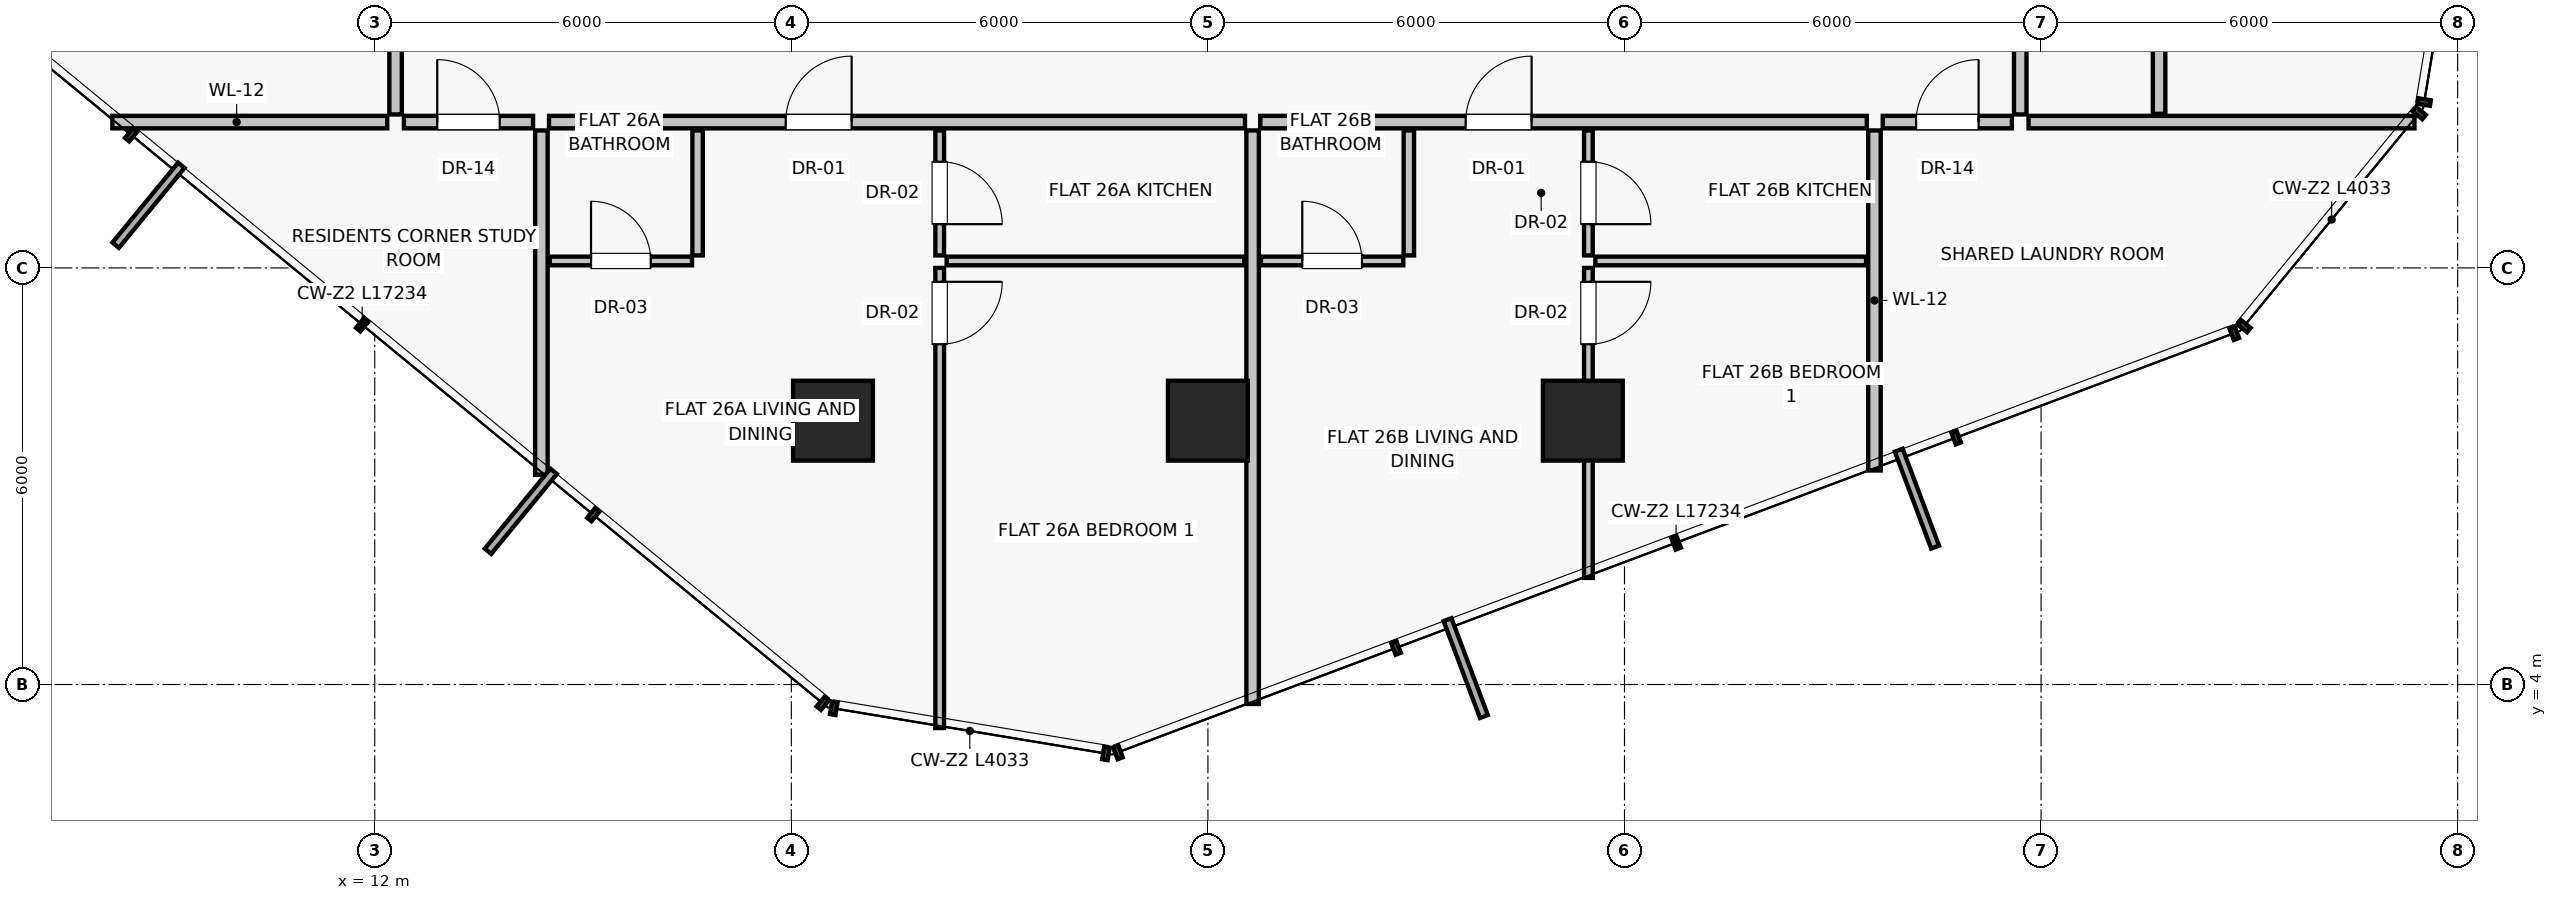
"""IFC4 building model, lengths in metres.
Left out: names, types, materials, properties, quantities, classifications, styles, units other than length and angle.
Written with IfcOpenShell. Run it as: python <this file> out.ifc"""

import sys

from ifc_helpers import new_model, si_unit, direction, frame, frame_2d, origin, origin_2d, place, context, subcontext, project, spatial, rectangle, extrude, source, transform, mapped, element, fill, save


model = new_model("IFC4")
c1 = context("Model", 3, precision=1e-05, world=origin(), true_north=direction((0.0, 1.0)))
c2 = subcontext(c1, "Body", "Model", "MODEL_VIEW")
j1 = project(units=[si_unit("LENGTHUNIT", "METRE"), si_unit("PLANEANGLEUNIT", "RADIAN")], contexts=[c1])
p1 = place(None, origin())
s1 = spatial("IfcSite", under=j1, at=p1, CompositionType="ELEMENT")
p2 = place(p1, origin())
s2 = spatial("IfcBuilding", under=s1, at=p2, CompositionType="ELEMENT")
p3 = place(p2, frame((0.0, 0.0, 95.95)))
s3 = spatial("IfcBuildingStorey", under=s2, at=p3, CompositionType="ELEMENT", Elevation=95.95)
for number, where, z_axis, x_axis in (
    (1, (18.6, 7.8, 0.0), (0.0, 0.0, 1.0), (1.0, 0.0, 0.0)),
    (2, (24.0, 7.8, 0.0), (0.0, 0.0, 1.0), (1.0, 0.0, 0.0)),
    (3, (29.4, 7.8, 0.0), (0.0, 0.0, 1.0), (1.0, 0.0, 0.0)),
):
    element("IfcColumn", number, at=place(p3, frame(where, z_axis=z_axis, x_axis=x_axis)), inside=s3, PredefinedType="COLUMN", context=c2, shape_type="SweptSolid", body=[
        extrude(rectangle(XDim=1.15, YDim=1.15, at=origin_2d()), origin(), (0.0, 0.0, 1.0), 3.25),
    ])
p4 = place(p3, frame((14.4, 11.98, 0.0), z_axis=(0.0, 0.0, 1.0), x_axis=(0.0, -1.0, 0.0)))
e4 = element("IfcWall", 4, at=p4, inside=s3, PredefinedType="PARTITIONING", context=c2, shape_type="SweptSolid", body=[
    extrude(rectangle(XDim=4.959, YDim=0.18, at=frame_2d((2.479, 0.0))), origin(), (0.0, 0.0, 1.0), 3.0),
])
p5 = place(p3, frame((33.6, 11.98, 0.0), z_axis=(0.0, 0.0, 1.0), x_axis=(0.0, -1.0, 0.0)))
e5 = element("IfcWall", 5, at=p5, inside=s3, PredefinedType="PARTITIONING", context=c2, shape_type="SweptSolid", body=[
    extrude(rectangle(XDim=4.897, YDim=0.18, at=frame_2d((2.449, 0.0))), origin(), (0.0, 0.0, 1.0), 3.0),
])
p6 = place(p3, frame((14.51, 12.1, 0.0), z_axis=(0.0, 0.0, 1.0), x_axis=(1.0, 0.0, 0.0)))
e6 = element("IfcWall", 6, at=p6, inside=s3, PredefinedType="PARTITIONING", context=c2, shape_type="SweptSolid", body=[
    extrude(rectangle(XDim=10.024, YDim=0.18, at=frame_2d((5.012, 0.0))), origin(), (0.0, 0.0, 1.0), 2.58),
])
p7 = place(p6, frame((3.408, 0.0, 0.0)))
e7 = element("IfcOpeningElement", 7, at=p7, cuts=e6, PredefinedType="OPENING", context=c2, shape_type="SweptSolid", body=[
    extrude(rectangle(XDim=0.95, YDim=2.02, at=frame_2d((0.475, 1.01))), frame((0.0, 0.1, 0.0), z_axis=(0.0, -1.0, 0.0), x_axis=(1.0, 0.0, 0.0)), (0.0, 0.0, 1.0), 0.2),
])
p8 = place(p3, frame((16.65, 11.98, 0.0), z_axis=(0.0, 0.0, 1.0), x_axis=(0.0, -1.0, 0.0)))
e8 = element("IfcWall", 8, at=p8, inside=s3, PredefinedType="PARTITIONING", context=c2, shape_type="SweptSolid", body=[
    extrude(rectangle(XDim=1.8, YDim=0.15, at=frame_2d((0.9, 0.0))), origin(), (0.0, 0.0, 1.0), 3.0),
])
p9 = place(p3, frame((14.52, 10.1, 0.0), z_axis=(0.0, 0.0, 1.0), x_axis=(1.0, 0.0, 0.0)))
e9 = element("IfcWall", 9, at=p9, inside=s3, PredefinedType="PARTITIONING", context=c2, shape_type="SweptSolid", body=[
    extrude(rectangle(XDim=2.05, YDim=0.125, at=frame_2d((1.025, 0.0))), origin(), (0.0, 0.0, 1.0), 3.0),
])
p10 = place(p9, frame((0.595, 0.0, 0.0)))
e10 = element("IfcOpeningElement", 10, at=p10, cuts=e9, PredefinedType="OPENING", context=c2, shape_type="SweptSolid", body=[
    extrude(rectangle(XDim=0.86, YDim=2.01, at=frame_2d((0.43, 1.005))), frame((0.0, 0.073, 0.0), z_axis=(0.0, -1.0, 0.0), x_axis=(1.0, 0.0, 0.0)), (0.0, 0.0, 1.0), 0.145),
])
p11 = place(p3, frame((20.137, 11.98, 0.0), z_axis=(0.0, 0.0, 1.0), x_axis=(0.0, -1.0, 0.0)))
e11 = element("IfcWall", 11, at=p11, inside=s3, PredefinedType="PARTITIONING", context=c2, shape_type="SweptSolid", body=[
    extrude(rectangle(XDim=1.8, YDim=0.125, at=frame_2d((0.9, 0.0))), origin(), (0.0, 0.0, 1.0), 3.0),
])
p12 = place(p11, frame((0.45, 0.0, 0.0)))
e12 = element("IfcOpeningElement", 12, at=p12, cuts=e11, PredefinedType="OPENING", context=c2, shape_type="SweptSolid", body=[
    extrude(rectangle(XDim=0.9, YDim=2.01, at=frame_2d((0.45, 1.005))), frame((0.0, 0.073, 0.0), z_axis=(0.0, -1.0, 0.0), x_axis=(1.0, 0.0, 0.0)), (0.0, 0.0, 1.0), 0.145),
])
p13 = place(p3, frame((20.237, 10.1, 0.0), z_axis=(0.0, 0.0, 1.0), x_axis=(1.0, 0.0, 0.0)))
e13 = element("IfcWall", 13, at=p13, inside=s3, PredefinedType="PARTITIONING", context=c2, shape_type="SweptSolid", body=[
    extrude(rectangle(XDim=4.287, YDim=0.125, at=frame_2d((2.144, 0.0))), origin(), (0.0, 0.0, 1.0), 3.0),
])
p14 = place(p3, frame((20.137, 10.0, 0.0), z_axis=(0.0, 0.0, 1.0), x_axis=(0.0, -1.0, 0.0)))
e14 = element("IfcWall", 14, at=p14, inside=s3, PredefinedType="PARTITIONING", context=c2, shape_type="SweptSolid", body=[
    extrude(rectangle(XDim=6.627, YDim=0.125, at=frame_2d((3.313, 0.0))), origin(), (0.0, 0.0, 1.0), 3.0),
])
p15 = place(p14, frame((0.2, 0.0, 0.0)))
e15 = element("IfcOpeningElement", 15, at=p15, cuts=e14, PredefinedType="OPENING", context=c2, shape_type="SweptSolid", body=[
    extrude(rectangle(XDim=0.9, YDim=2.01, at=frame_2d((0.45, 1.005))), frame((0.0, 0.073, 0.0), z_axis=(0.0, -1.0, 0.0), x_axis=(1.0, 0.0, 0.0)), (0.0, 0.0, 1.0), 0.145),
])
p16 = place(p3, frame((24.644, 11.98, 0.0), z_axis=(0.0, 0.0, 1.0), x_axis=(0.0, -1.0, 0.0)))
e16 = element("IfcWall", 16, at=p16, inside=s3, PredefinedType="PARTITIONING", context=c2, shape_type="SweptSolid", body=[
    extrude(rectangle(XDim=8.26, YDim=0.18, at=frame_2d((4.13, 0.0))), origin(), (0.0, 0.0, 1.0), 3.0),
])
p17 = place(p3, frame((24.754, 12.1, 0.0), z_axis=(0.0, 0.0, 1.0), x_axis=(1.0, 0.0, 0.0)))
e17 = element("IfcWall", 17, at=p17, inside=s3, PredefinedType="PARTITIONING", context=c2, shape_type="SweptSolid", body=[
    extrude(rectangle(XDim=8.736, YDim=0.18, at=frame_2d((4.368, 0.0))), origin(), (0.0, 0.0, 1.0), 2.58),
])
p18 = place(p17, frame((2.958, 0.0, 0.0)))
e18 = element("IfcOpeningElement", 18, at=p18, cuts=e17, PredefinedType="OPENING", context=c2, shape_type="SweptSolid", body=[
    extrude(rectangle(XDim=0.95, YDim=2.02, at=frame_2d((0.475, 1.01))), frame((0.0, 0.1, 0.0), z_axis=(0.0, -1.0, 0.0), x_axis=(1.0, 0.0, 0.0)), (0.0, 0.0, 1.0), 0.2),
])
p19 = place(p3, frame((26.894, 11.98, 0.0), z_axis=(0.0, 0.0, 1.0), x_axis=(0.0, -1.0, 0.0)))
e19 = element("IfcWall", 19, at=p19, inside=s3, PredefinedType="PARTITIONING", context=c2, shape_type="SweptSolid", body=[
    extrude(rectangle(XDim=1.8, YDim=0.15, at=frame_2d((0.9, 0.0))), origin(), (0.0, 0.0, 1.0), 3.0),
])
p20 = place(p3, frame((24.764, 10.1, 0.0), z_axis=(0.0, 0.0, 1.0), x_axis=(1.0, 0.0, 0.0)))
e20 = element("IfcWall", 20, at=p20, inside=s3, PredefinedType="PARTITIONING", context=c2, shape_type="SweptSolid", body=[
    extrude(rectangle(XDim=2.05, YDim=0.125, at=frame_2d((1.025, 0.0))), origin(), (0.0, 0.0, 1.0), 3.0),
])
p21 = place(p20, frame((0.595, 0.0, 0.0)))
e21 = element("IfcOpeningElement", 21, at=p21, cuts=e20, PredefinedType="OPENING", context=c2, shape_type="SweptSolid", body=[
    extrude(rectangle(XDim=0.86, YDim=2.01, at=frame_2d((0.43, 1.005))), frame((0.0, 0.073, 0.0), z_axis=(0.0, -1.0, 0.0), x_axis=(1.0, 0.0, 0.0)), (0.0, 0.0, 1.0), 0.145),
])
p22 = place(p3, frame((29.48, 11.98, 0.0), z_axis=(0.0, 0.0, 1.0), x_axis=(0.0, -1.0, 0.0)))
e22 = element("IfcWall", 22, at=p22, inside=s3, PredefinedType="PARTITIONING", context=c2, shape_type="SweptSolid", body=[
    extrude(rectangle(XDim=1.8, YDim=0.125, at=frame_2d((0.9, 0.0))), origin(), (0.0, 0.0, 1.0), 2.378),
])
p23 = place(p22, frame((0.45, 0.0, 0.0)))
e23 = element("IfcOpeningElement", 23, at=p23, cuts=e22, PredefinedType="OPENING", context=c2, shape_type="SweptSolid", body=[
    extrude(rectangle(XDim=0.9, YDim=2.01, at=frame_2d((0.45, 1.005))), frame((0.0, 0.073, 0.0), z_axis=(0.0, -1.0, 0.0), x_axis=(1.0, 0.0, 0.0)), (0.0, 0.0, 1.0), 0.145),
])
p24 = place(p3, frame((29.58, 10.1, 0.0), z_axis=(0.0, 0.0, 1.0), x_axis=(1.0, 0.0, 0.0)))
e24 = element("IfcWall", 24, at=p24, inside=s3, PredefinedType="PARTITIONING", context=c2, shape_type="SweptSolid", body=[
    extrude(rectangle(XDim=3.9, YDim=0.125, at=frame_2d((1.95, 0.0))), origin(), (0.0, 0.0, 1.0), 3.0),
])
p25 = place(p3, frame((29.48, 10.0, 0.0), z_axis=(0.0, 0.0, 1.0), x_axis=(0.0, -1.0, 0.0)))
e25 = element("IfcWall", 25, at=p25, inside=s3, PredefinedType="PARTITIONING", context=c2, shape_type="SweptSolid", body=[
    extrude(rectangle(XDim=4.465, YDim=0.125, at=frame_2d((2.232, 0.0))), origin(), (0.0, 0.0, 1.0), 2.378),
])
p26 = place(p25, frame((0.2, 0.0, 0.0)))
e26 = element("IfcOpeningElement", 26, at=p26, cuts=e25, PredefinedType="OPENING", context=c2, shape_type="SweptSolid", body=[
    extrude(rectangle(XDim=0.9, YDim=2.01, at=frame_2d((0.45, 1.005))), frame((0.0, 0.073, 0.0), z_axis=(0.0, -1.0, 0.0), x_axis=(1.0, 0.0, 0.0)), (0.0, 0.0, 1.0), 0.145),
])
p27 = place(p3, frame((12.18, 12.1, 0.0), z_axis=(0.0, 0.0, 1.0), x_axis=(-1.0, 0.0, 0.0)))
e27 = element("IfcWall", 27, at=p27, inside=s3, PredefinedType="PARTITIONING", context=c2, shape_type="SweptSolid", body=[
    extrude(rectangle(XDim=3.959, YDim=0.18, at=frame_2d((1.979, 0.0))), origin(), (0.0, 0.0, 1.0), 3.0),
])
p28 = place(p3, frame((12.3, 12.21, 0.0), z_axis=(0.0, 0.0, 1.0), x_axis=(0.0, 1.0, 0.0)))
e28 = element("IfcWall", 28, at=p28, inside=s3, PredefinedType="PARTITIONING", context=c2, shape_type="SweptSolid", body=[
    extrude(rectangle(XDim=4.626, YDim=0.18, at=frame_2d((2.313, 0.0))), origin(), (0.0, 0.0, 1.0), 3.0),
])
p29 = place(p28, frame((1.813, 0.0, 0.0)))
e29 = element("IfcOpeningElement", 29, at=p29, cuts=e28, PredefinedType="OPENING", context=c2, shape_type="SweptSolid", body=[
    extrude(rectangle(XDim=1.0, YDim=2.01, at=frame_2d((0.5, 1.005))), frame((0.0, 0.1, 0.0), z_axis=(0.0, -1.0, 0.0), x_axis=(1.0, 0.0, 0.0)), (0.0, 0.0, 1.0), 0.2),
])
p30 = place(p3, frame((35.82, 12.1, 0.0), z_axis=(0.0, 0.0, 1.0), x_axis=(1.0, 0.0, 0.0)))
e30 = element("IfcWall", 30, at=p30, inside=s3, PredefinedType="PARTITIONING", context=c2, shape_type="SweptSolid", body=[
    extrude(rectangle(XDim=5.558, YDim=0.18, at=frame_2d((2.779, 0.0))), origin(), (0.0, 0.0, 1.0), 3.0),
])
p31 = place(p3, frame((35.7, 12.21, 0.0), z_axis=(0.0, 0.0, 1.0), x_axis=(0.0, 1.0, 0.0)))
e31 = element("IfcWall", 31, at=p31, inside=s3, PredefinedType="PARTITIONING", context=c2, shape_type="SweptSolid", body=[
    extrude(rectangle(XDim=6.28, YDim=0.18, at=frame_2d((3.14, 0.0))), origin(), (0.0, 0.0, 1.0), 2.58),
])
p32 = place(p31, frame((2.64, 0.0, 0.0)))
e32 = element("IfcOpeningElement", 32, at=p32, cuts=e31, PredefinedType="OPENING", context=c2, shape_type="SweptSolid", body=[
    extrude(rectangle(XDim=1.0, YDim=2.01, at=frame_2d((0.5, 1.005))), frame((0.0, 0.1, 0.0), z_axis=(0.0, -1.0, 0.0), x_axis=(1.0, 0.0, 0.0)), (0.0, 0.0, 1.0), 0.2),
])
p33 = place(p3, frame((37.7, 12.22, 0.0), z_axis=(0.0, 0.0, 1.0), x_axis=(0.0, 1.0, 0.0)))
e33 = element("IfcWall", 33, at=p33, inside=s3, PredefinedType="PARTITIONING", context=c2, shape_type="SweptSolid", body=[
    extrude(rectangle(XDim=6.28, YDim=0.18, at=frame_2d((3.14, 0.0))), origin(), (0.0, 0.0, 1.0), 3.0),
])
p34 = place(p3, frame((12.42, 12.1, 0.0), z_axis=(0.0, 0.0, 1.0), x_axis=(1.0, 0.0, 0.0)))
e34 = element("IfcWall", 34, at=p34, inside=s3, PredefinedType="PARTITIONING", context=c2, shape_type="SweptSolid", body=[
    extrude(rectangle(XDim=1.86, YDim=0.18, at=frame_2d((0.93, 0.0))), origin(), (0.0, 0.0, 1.0), 3.0),
])
p35 = place(p34, frame((0.48, 0.0, 0.0)))
e35 = element("IfcOpeningElement", 35, at=p35, cuts=e34, PredefinedType="OPENING", context=c2, shape_type="SweptSolid", body=[
    extrude(rectangle(XDim=0.9, YDim=2.01, at=frame_2d((0.45, 1.005))), frame((0.0, 0.1, 0.0), z_axis=(0.0, -1.0, 0.0), x_axis=(1.0, 0.0, 0.0)), (0.0, 0.0, 1.0), 0.2),
])
p36 = place(p3, frame((33.72, 12.1, 0.0), z_axis=(0.0, 0.0, 1.0), x_axis=(1.0, 0.0, 0.0)))
e36 = element("IfcWall", 36, at=p36, inside=s3, PredefinedType="PARTITIONING", context=c2, shape_type="SweptSolid", body=[
    extrude(rectangle(XDim=1.86, YDim=0.18, at=frame_2d((0.93, 0.0))), origin(), (0.0, 0.0, 1.0), 3.0),
])
p37 = place(p36, frame((0.48, 0.0, 0.0)))
e37 = element("IfcOpeningElement", 37, at=p37, cuts=e36, PredefinedType="OPENING", context=c2, shape_type="SweptSolid", body=[
    extrude(rectangle(XDim=0.9, YDim=2.01, at=frame_2d((0.45, 1.005))), frame((0.0, 0.1, 0.0), z_axis=(0.0, -1.0, 0.0), x_axis=(1.0, 0.0, 0.0)), (0.0, 0.0, 1.0), 0.2),
])
m1 = source(origin(), c2, "Body", "SweptSolid", [
    extrude(rectangle(XDim=0.95, YDim=2.02, at=frame_2d((0.475, 1.01))), frame((0.0, 0.025, 0.0), z_axis=(0.0, -1.0, 0.0), x_axis=(1.0, 0.0, 0.0)), (0.0, 0.0, 1.0), 0.05),
])
p38 = place(p7, origin())
e38 = element("IfcDoor", 38, at=p38, inside=s3, OperationType="SINGLE_SWING_RIGHT", PredefinedType="DOOR", context=c2, shape_type="MappedRepresentation", body=[
    mapped(m1, transform((0.0, 0.0, 0.0), scale=1.0)),
])
fill(e7, e38)
m2 = source(origin(), c2, "Body", "SweptSolid", [
    extrude(rectangle(XDim=0.86, YDim=2.01, at=frame_2d((0.43, 1.005))), frame((0.0, 0.025, 0.0), z_axis=(0.0, -1.0, 0.0), x_axis=(1.0, 0.0, 0.0)), (0.0, 0.0, 1.0), 0.05),
])
p39 = place(p10, origin())
e39 = element("IfcDoor", 39, at=p39, inside=s3, OperationType="SINGLE_SWING_LEFT", PredefinedType="DOOR", context=c2, shape_type="MappedRepresentation", body=[
    mapped(m2, transform((0.0, 0.0, 0.0), scale=1.0)),
])
fill(e10, e39)
m3 = source(origin(), c2, "Body", "SweptSolid", [
    extrude(rectangle(XDim=0.9, YDim=2.01, at=frame_2d((0.45, 1.005))), frame((0.0, 0.025, 0.0), z_axis=(0.0, -1.0, 0.0), x_axis=(1.0, 0.0, 0.0)), (0.0, 0.0, 1.0), 0.05),
])
p40 = place(p12, origin())
e40 = element("IfcDoor", 40, at=p40, inside=s3, OperationType="SINGLE_SWING_RIGHT", PredefinedType="DOOR", context=c2, shape_type="MappedRepresentation", body=[
    mapped(m3, transform((0.0, 0.0, 0.0), scale=1.0)),
])
fill(e12, e40)
p41 = place(p15, origin())
e41 = element("IfcDoor", 41, at=p41, inside=s3, OperationType="SINGLE_SWING_LEFT", PredefinedType="DOOR", context=c2, shape_type="MappedRepresentation", body=[
    mapped(m3, transform((0.0, 0.0, 0.0), scale=1.0)),
])
fill(e15, e41)
p42 = place(p18, origin())
e42 = element("IfcDoor", 42, at=p42, inside=s3, OperationType="SINGLE_SWING_RIGHT", PredefinedType="DOOR", context=c2, shape_type="MappedRepresentation", body=[
    mapped(m1, transform((0.0, 0.0, 0.0), scale=1.0)),
])
fill(e18, e42)
p43 = place(p21, origin())
e43 = element("IfcDoor", 43, at=p43, inside=s3, OperationType="SINGLE_SWING_LEFT", PredefinedType="DOOR", context=c2, shape_type="MappedRepresentation", body=[
    mapped(m2, transform((0.0, 0.0, 0.0), scale=1.0)),
])
fill(e21, e43)
p44 = place(p23, origin())
e44 = element("IfcDoor", 44, at=p44, inside=s3, OperationType="SINGLE_SWING_RIGHT", PredefinedType="DOOR", context=c2, shape_type="MappedRepresentation", body=[
    mapped(m3, transform((0.0, 0.0, 0.0), scale=1.0)),
])
fill(e23, e44)
p45 = place(p26, origin())
e45 = element("IfcDoor", 45, at=p45, inside=s3, OperationType="SINGLE_SWING_LEFT", PredefinedType="DOOR", context=c2, shape_type="MappedRepresentation", body=[
    mapped(m3, transform((0.0, 0.0, 0.0), scale=1.0)),
])
fill(e26, e45)
p46 = place(p35, origin())
e46 = element("IfcDoor", 46, at=p46, inside=s3, OperationType="SINGLE_SWING_LEFT", PredefinedType="DOOR", context=c2, shape_type="MappedRepresentation", body=[
    mapped(m3, transform((0.0, 0.0, 0.0), scale=1.0)),
])
fill(e35, e46)
p47 = place(p37, origin())
e47 = element("IfcDoor", 47, at=p47, inside=s3, OperationType="SINGLE_SWING_RIGHT", PredefinedType="DOOR", context=c2, shape_type="MappedRepresentation", body=[
    mapped(m3, transform((0.0, 0.0, 0.0), scale=1.0)),
])
fill(e37, e47)
save(model, sys.argv[1])
